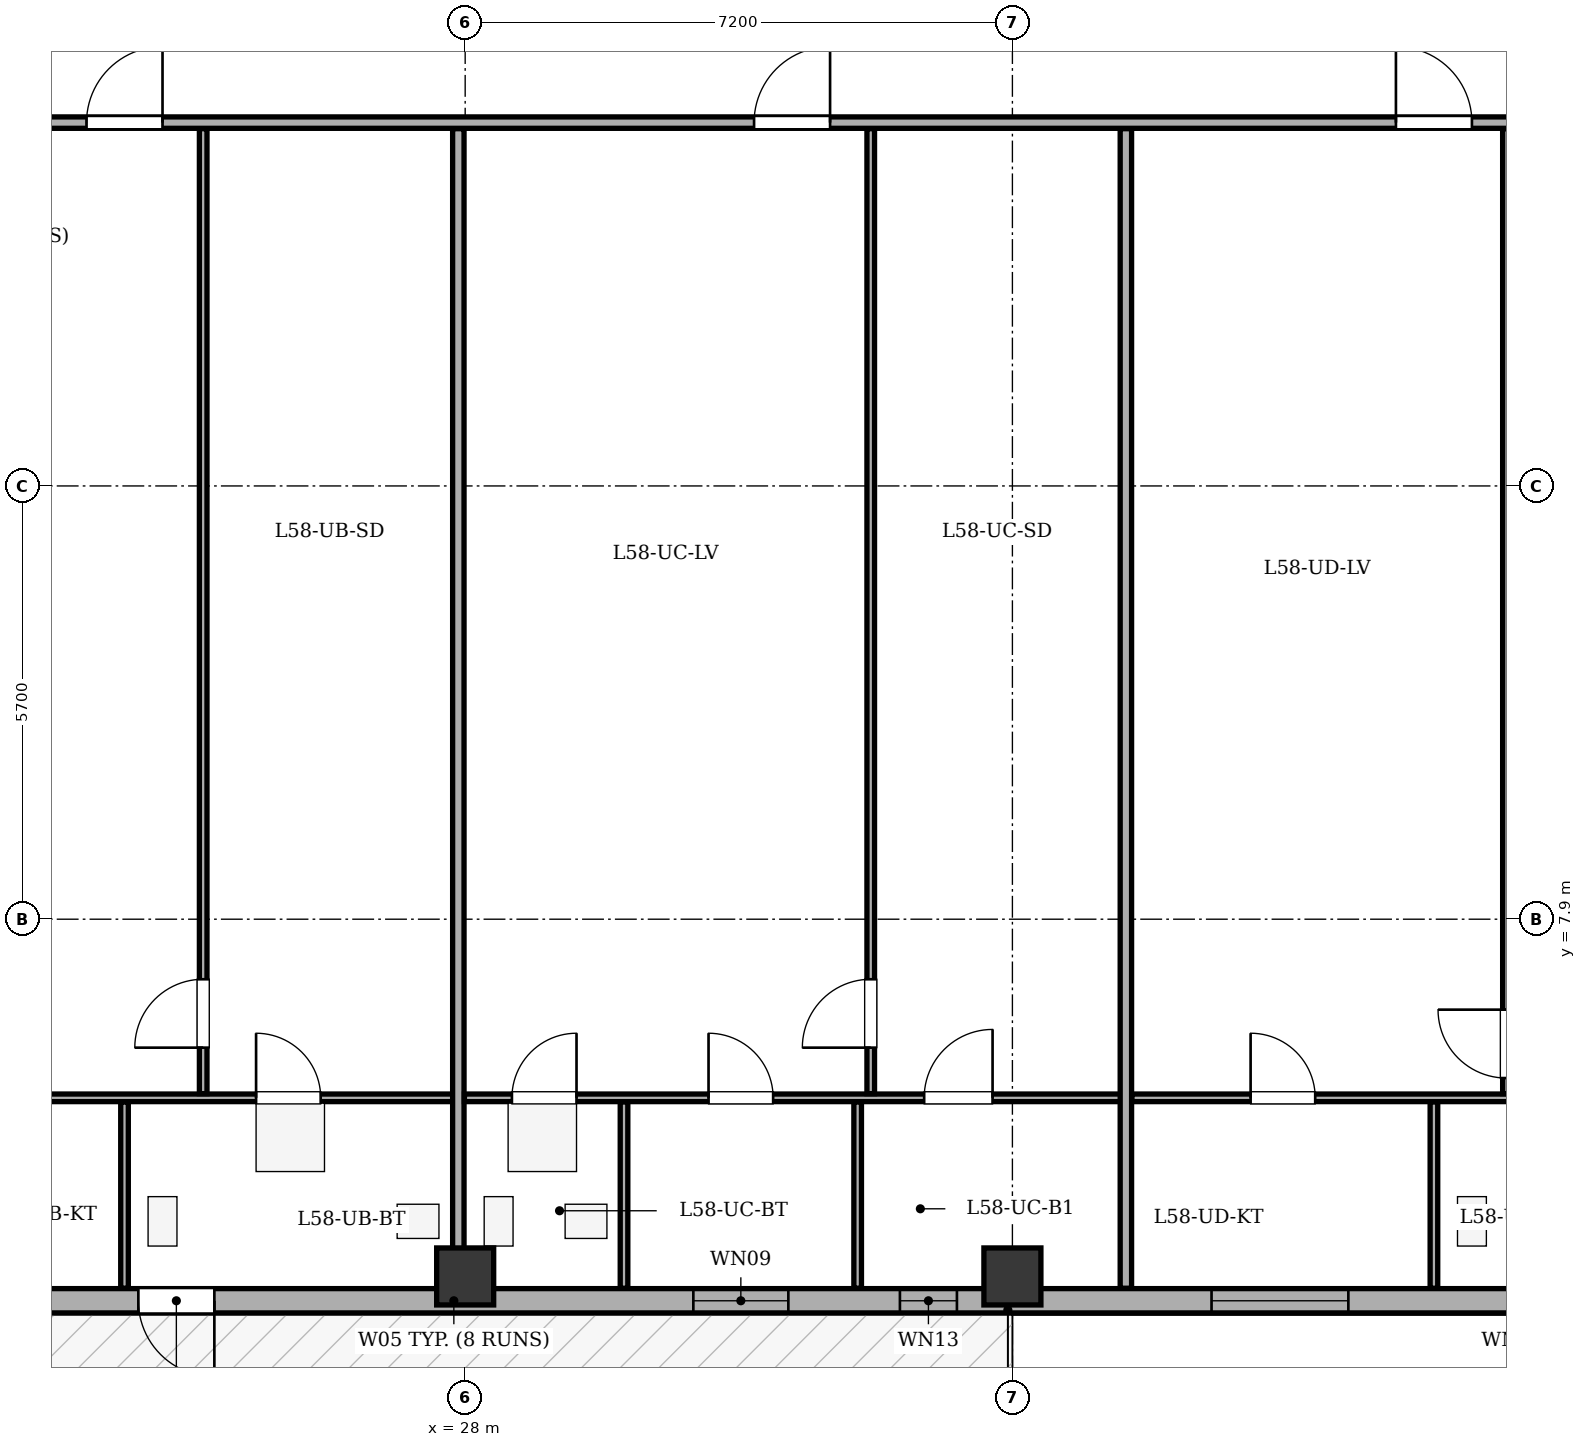
"""IFC4 building model, lengths in metres.
Left out: names, types, materials, properties, quantities, classifications, styles, units other than length and angle.
Written with IfcOpenShell. Run it as: python <this file> out.ifc"""

import sys

from ifc_helpers import new_model, si_unit, direction, frame, frame_2d, origin, origin_2d, place, context, subcontext, project, spatial, rectangle, extrude, element, fill, save


model = new_model("IFC4")
c1 = context("Model", 3, precision=1e-05, world=origin(), true_north=direction((0.0, 1.0)))
c2 = subcontext(c1, "Body", "Model", "MODEL_VIEW")
j1 = project(units=[si_unit("LENGTHUNIT", "METRE"), si_unit("PLANEANGLEUNIT", "RADIAN")], contexts=[c1])
p1 = place(None, origin())
s1 = spatial("IfcSite", under=j1, at=p1, CompositionType="ELEMENT")
p2 = place(p1, origin())
s2 = spatial("IfcBuilding", under=s1, at=p2, CompositionType="ELEMENT")
p3 = place(p2, frame((0.0, 0.0, 224.5)))
s3 = spatial("IfcBuildingStorey", under=s2, at=p3, CompositionType="ELEMENT", Elevation=224.5)
for number, where, z_axis, x_axis in (
    (1, (28.0, 3.2, 0.0), (0.0, 0.0, 1.0), (1.0, 0.0, 0.0)),
    (2, (35.2, 3.2, 0.0), (0.0, 0.0, 1.0), (1.0, 0.0, 0.0)),
):
    element("IfcColumn", number, at=place(p3, frame(where, z_axis=z_axis, x_axis=x_axis)), inside=s3, PredefinedType="COLUMN", context=c2, shape_type="SweptSolid", body=[
        extrude(rectangle(XDim=0.75, YDim=0.75, at=origin_2d()), origin(), (0.0, 0.0, 1.0), 3.4),
    ])
p4 = place(p3, frame((44.8, 2.88, 0.0), z_axis=(0.0, 0.0, 1.0), x_axis=(-1.0, 0.0, 0.0)))
e3 = element("IfcWall", 3, at=p4, inside=s3, PredefinedType="STANDARD", context=c2, shape_type="SweptSolid", body=[
    extrude(rectangle(XDim=36.0, YDim=0.32, at=frame_2d((18.0, 0.0))), origin(), (0.0, 0.0, 1.0), 2.335),
])
p5 = place(p4, frame((20.1, 0.0, 0.0)))
e4 = element("IfcOpeningElement", 4, at=p5, cuts=e3, PredefinedType="OPENING", context=c2, shape_type="SweptSolid", body=[
    extrude(rectangle(XDim=1.0, YDim=2.02, at=frame_2d((0.5, 1.01))), frame((0.0, 0.17, 0.0), z_axis=(0.0, -1.0, 0.0), x_axis=(1.0, 0.0, 0.0)), (0.0, 0.0, 1.0), 0.34),
])
p6 = place(p4, frame((1.227, 0.0, 0.75)))
e5 = element("IfcOpeningElement", 5, at=p6, cuts=e3, PredefinedType="OPENING", context=c2, shape_type="SweptSolid", body=[
    extrude(rectangle(XDim=1.8, YDim=1.465, at=frame_2d((0.9, 0.732))), frame((0.0, 0.17, 0.0), z_axis=(0.0, -1.0, 0.0), x_axis=(1.0, 0.0, 0.0)), (0.0, 0.0, 1.0), 0.34),
])
p7 = place(p4, frame((5.18, 0.0, 0.75)))
e6 = element("IfcOpeningElement", 6, at=p7, cuts=e3, PredefinedType="OPENING", context=c2, shape_type="SweptSolid", body=[
    extrude(rectangle(XDim=1.8, YDim=1.465, at=frame_2d((0.9, 0.732))), frame((0.0, 0.17, 0.0), z_axis=(0.0, -1.0, 0.0), x_axis=(1.0, 0.0, 0.0)), (0.0, 0.0, 1.0), 0.34),
])
p8 = place(p4, frame((12.548, 0.0, 0.75)))
e7 = element("IfcOpeningElement", 7, at=p8, cuts=e3, PredefinedType="OPENING", context=c2, shape_type="SweptSolid", body=[
    extrude(rectangle(XDim=1.25, YDim=1.465, at=frame_2d((0.625, 0.732))), frame((0.0, 0.17, 0.0), z_axis=(0.0, -1.0, 0.0), x_axis=(1.0, 0.0, 0.0)), (0.0, 0.0, 1.0), 0.34),
])
p9 = place(p4, frame((26.587, 0.0, 0.75)))
e8 = element("IfcOpeningElement", 8, at=p9, cuts=e3, PredefinedType="OPENING", context=c2, shape_type="SweptSolid", body=[
    extrude(rectangle(XDim=1.8, YDim=1.465, at=frame_2d((0.9, 0.732))), frame((0.0, 0.17, 0.0), z_axis=(0.0, -1.0, 0.0), x_axis=(1.0, 0.0, 0.0)), (0.0, 0.0, 1.0), 0.34),
])
p10 = place(p4, frame((30.94, 0.0, 0.75)))
e9 = element("IfcOpeningElement", 9, at=p10, cuts=e3, PredefinedType="OPENING", context=c2, shape_type="SweptSolid", body=[
    extrude(rectangle(XDim=1.8, YDim=1.465, at=frame_2d((0.9, 0.732))), frame((0.0, 0.17, 0.0), z_axis=(0.0, -1.0, 0.0), x_axis=(1.0, 0.0, 0.0)), (0.0, 0.0, 1.0), 0.34),
])
p11 = place(p4, frame((10.33, 0.0, 0.75)))
e10 = element("IfcOpeningElement", 10, at=p11, cuts=e3, PredefinedType="OPENING", context=c2, shape_type="SweptSolid", body=[
    extrude(rectangle(XDim=0.75, YDim=1.45, at=frame_2d((0.375, 0.725))), frame((0.0, 0.17, 0.0), z_axis=(0.0, -1.0, 0.0), x_axis=(1.0, 0.0, 0.0)), (0.0, 0.0, 1.0), 0.34),
])
p12 = place(p3, frame((10.9, 18.38, 0.0), z_axis=(0.0, 0.0, 1.0), x_axis=(1.0, 0.0, 0.0)))
e11 = element("IfcWall", 11, at=p12, inside=s3, PredefinedType="PARTITIONING", context=c2, shape_type="SweptSolid", body=[
    extrude(rectangle(XDim=34.02, YDim=0.15, at=frame_2d((17.01, 0.0))), origin(), (0.0, 0.0, 1.0), 2.95),
])
p13 = place(p12, frame((2.774, 0.0, 0.0)))
e12 = element("IfcOpeningElement", 12, at=p13, cuts=e11, PredefinedType="OPENING", context=c2, shape_type="SweptSolid", body=[
    extrude(rectangle(XDim=1.0, YDim=2.1, at=frame_2d((0.5, 1.05))), frame((0.0, 0.085, 0.0), z_axis=(0.0, -1.0, 0.0), x_axis=(1.0, 0.0, 0.0)), (0.0, 0.0, 1.0), 0.17),
])
p14 = place(p12, frame((12.118, 0.0, 0.0)))
e13 = element("IfcOpeningElement", 13, at=p14, cuts=e11, PredefinedType="OPENING", context=c2, shape_type="SweptSolid", body=[
    extrude(rectangle(XDim=1.0, YDim=2.1, at=frame_2d((0.5, 1.05))), frame((0.0, 0.085, 0.0), z_axis=(0.0, -1.0, 0.0), x_axis=(1.0, 0.0, 0.0)), (0.0, 0.0, 1.0), 0.17),
])
p15 = place(p12, frame((20.901, 0.0, 0.0)))
e14 = element("IfcOpeningElement", 14, at=p15, cuts=e11, PredefinedType="OPENING", context=c2, shape_type="SweptSolid", body=[
    extrude(rectangle(XDim=1.0, YDim=2.1, at=frame_2d((0.5, 1.05))), frame((0.0, 0.085, 0.0), z_axis=(0.0, -1.0, 0.0), x_axis=(1.0, 0.0, 0.0)), (0.0, 0.0, 1.0), 0.17),
])
p16 = place(p12, frame((29.346, 0.0, 0.0)))
e15 = element("IfcOpeningElement", 15, at=p16, cuts=e11, PredefinedType="OPENING", context=c2, shape_type="SweptSolid", body=[
    extrude(rectangle(XDim=1.0, YDim=2.1, at=frame_2d((0.5, 1.05))), frame((0.0, 0.085, 0.0), z_axis=(0.0, -1.0, 0.0), x_axis=(1.0, 0.0, 0.0)), (0.0, 0.0, 1.0), 0.17),
])
p17 = place(p3, frame((19.207, 5.55, 0.0), z_axis=(0.0, 0.0, 1.0), x_axis=(1.0, 0.0, 0.0)))
e16 = element("IfcWall", 16, at=p17, inside=s3, PredefinedType="PARTITIONING", context=c2, shape_type="SweptSolid", body=[
    extrude(rectangle(XDim=8.743, YDim=0.1, at=frame_2d((4.372, 0.0))), origin(), (0.0, 0.0, 1.0), 2.95),
])
p18 = place(p17, frame((1.83, 0.0, 0.0)))
e17 = element("IfcOpeningElement", 17, at=p18, cuts=e16, PredefinedType="OPENING", context=c2, shape_type="SweptSolid", body=[
    extrude(rectangle(XDim=0.85, YDim=2.05, at=frame_2d((0.425, 1.025))), frame((0.0, 0.06, 0.0), z_axis=(0.0, -1.0, 0.0), x_axis=(1.0, 0.0, 0.0)), (0.0, 0.0, 1.0), 0.12),
])
p19 = place(p17, frame((6.042, 0.0, 0.0)))
e18 = element("IfcOpeningElement", 18, at=p19, cuts=e16, PredefinedType="OPENING", context=c2, shape_type="SweptSolid", body=[
    extrude(rectangle(XDim=0.85, YDim=2.05, at=frame_2d((0.425, 1.025))), frame((0.0, 0.06, 0.0), z_axis=(0.0, -1.0, 0.0), x_axis=(1.0, 0.0, 0.0)), (0.0, 0.0, 1.0), 0.12),
])
p20 = place(p3, frame((24.553, 5.605, 0.0), z_axis=(0.0, 0.0, 1.0), x_axis=(0.0, 1.0, 0.0)))
e19 = element("IfcWall", 19, at=p20, inside=s3, PredefinedType="PARTITIONING", context=c2, shape_type="SweptSolid", body=[
    extrude(rectangle(XDim=12.695, YDim=0.1, at=frame_2d((6.348, 0.0))), origin(), (0.0, 0.0, 1.0), 2.95),
])
p21 = place(p20, frame((0.605, 0.0, 0.0)))
e20 = element("IfcOpeningElement", 20, at=p21, cuts=e19, PredefinedType="OPENING", context=c2, shape_type="SweptSolid", body=[
    extrude(rectangle(XDim=0.9, YDim=2.05, at=frame_2d((0.45, 1.025))), frame((0.0, 0.06, 0.0), z_axis=(0.0, -1.0, 0.0), x_axis=(1.0, 0.0, 0.0)), (0.0, 0.0, 1.0), 0.12),
])
p22 = place(p3, frame((23.518, 3.045, 0.0), z_axis=(0.0, 0.0, 1.0), x_axis=(0.0, 1.0, 0.0)))
e21 = element("IfcWall", 21, at=p22, inside=s3, PredefinedType="PARTITIONING", context=c2, shape_type="SweptSolid", body=[
    extrude(rectangle(XDim=2.45, YDim=0.1, at=frame_2d((1.225, 0.0))), origin(), (0.0, 0.0, 1.0), 2.95),
])
p23 = place(p3, frame((27.91, 3.045, 0.0), z_axis=(0.0, 0.0, 1.0), x_axis=(0.0, 1.0, 0.0)))
e22 = element("IfcWall", 22, at=p23, inside=s3, PredefinedType="PARTITIONING", context=c2, shape_type="SweptSolid", body=[
    extrude(rectangle(XDim=15.255, YDim=0.15, at=frame_2d((7.627, 0.0))), origin(), (0.0, 0.0, 1.0), 2.135),
])
p24 = place(p3, frame((27.99, 5.55, 0.0), z_axis=(0.0, 0.0, 1.0), x_axis=(1.0, 0.0, 0.0)))
e23 = element("IfcWall", 23, at=p24, inside=s3, PredefinedType="PARTITIONING", context=c2, shape_type="SweptSolid", body=[
    extrude(rectangle(XDim=8.743, YDim=0.1, at=frame_2d((4.372, 0.0))), origin(), (0.0, 0.0, 1.0), 2.95),
])
p25 = place(p24, frame((0.625, 0.0, 0.0)))
e24 = element("IfcOpeningElement", 24, at=p25, cuts=e23, PredefinedType="OPENING", context=c2, shape_type="SweptSolid", body=[
    extrude(rectangle(XDim=0.85, YDim=2.05, at=frame_2d((0.425, 1.025))), frame((0.0, 0.06, 0.0), z_axis=(0.0, -1.0, 0.0), x_axis=(1.0, 0.0, 0.0)), (0.0, 0.0, 1.0), 0.12),
])
p26 = place(p24, frame((3.212, 0.0, 0.0)))
e25 = element("IfcOpeningElement", 25, at=p26, cuts=e23, PredefinedType="OPENING", context=c2, shape_type="SweptSolid", body=[
    extrude(rectangle(XDim=0.85, YDim=2.05, at=frame_2d((0.425, 1.025))), frame((0.0, 0.06, 0.0), z_axis=(0.0, -1.0, 0.0), x_axis=(1.0, 0.0, 0.0)), (0.0, 0.0, 1.0), 0.12),
])
p27 = place(p24, frame((6.049, 0.0, 0.0)))
e26 = element("IfcOpeningElement", 26, at=p27, cuts=e23, PredefinedType="OPENING", context=c2, shape_type="SweptSolid", body=[
    extrude(rectangle(XDim=0.9, YDim=2.05, at=frame_2d((0.45, 1.025))), frame((0.0, 0.06, 0.0), z_axis=(0.0, -1.0, 0.0), x_axis=(1.0, 0.0, 0.0)), (0.0, 0.0, 1.0), 0.12),
])
p28 = place(p3, frame((33.336, 5.605, 0.0), z_axis=(0.0, 0.0, 1.0), x_axis=(0.0, 1.0, 0.0)))
e27 = element("IfcWall", 27, at=p28, inside=s3, PredefinedType="PARTITIONING", context=c2, shape_type="SweptSolid", body=[
    extrude(rectangle(XDim=12.695, YDim=0.1, at=frame_2d((6.348, 0.0))), origin(), (0.0, 0.0, 1.0), 2.95),
])
p29 = place(p28, frame((0.605, 0.0, 0.0)))
e28 = element("IfcOpeningElement", 28, at=p29, cuts=e27, PredefinedType="OPENING", context=c2, shape_type="SweptSolid", body=[
    extrude(rectangle(XDim=0.9, YDim=2.05, at=frame_2d((0.45, 1.025))), frame((0.0, 0.06, 0.0), z_axis=(0.0, -1.0, 0.0), x_axis=(1.0, 0.0, 0.0)), (0.0, 0.0, 1.0), 0.12),
])
for number, where, z_axis, x_axis in (
    (29, (30.09, 3.045, 0.0), (0.0, 0.0, 1.0), (0.0, 1.0, 0.0)),
    (30, (33.164, 3.045, 0.0), (0.0, 0.0, 1.0), (0.0, 1.0, 0.0)),
):
    element("IfcWall", number, at=place(p3, frame(where, z_axis=z_axis, x_axis=x_axis)), inside=s3, PredefinedType="PARTITIONING", context=c2, shape_type="SweptSolid", body=[
        extrude(rectangle(XDim=2.45, YDim=0.1, at=frame_2d((1.225, 0.0))), origin(), (0.0, 0.0, 1.0), 2.95),
    ])
p30 = place(p3, frame((36.693, 3.045, 0.0), z_axis=(0.0, 0.0, 1.0), x_axis=(0.0, 1.0, 0.0)))
e31 = element("IfcWall", 31, at=p30, inside=s3, PredefinedType="PARTITIONING", context=c2, shape_type="SweptSolid", body=[
    extrude(rectangle(XDim=15.255, YDim=0.15, at=frame_2d((7.627, 0.0))), origin(), (0.0, 0.0, 1.0), 2.385),
])
p31 = place(p3, frame((36.773, 5.55, 0.0), z_axis=(0.0, 0.0, 1.0), x_axis=(1.0, 0.0, 0.0)))
e32 = element("IfcWall", 32, at=p31, inside=s3, PredefinedType="PARTITIONING", context=c2, shape_type="SweptSolid", body=[
    extrude(rectangle(XDim=8.067, YDim=0.1, at=frame_2d((4.034, 0.0))), origin(), (0.0, 0.0, 1.0), 2.95),
])
p32 = place(p31, frame((1.561, 0.0, 0.0)))
e33 = element("IfcOpeningElement", 33, at=p32, cuts=e32, PredefinedType="OPENING", context=c2, shape_type="SweptSolid", body=[
    extrude(rectangle(XDim=0.85, YDim=2.05, at=frame_2d((0.425, 1.025))), frame((0.0, 0.06, 0.0), z_axis=(0.0, -1.0, 0.0), x_axis=(1.0, 0.0, 0.0)), (0.0, 0.0, 1.0), 0.12),
])
p33 = place(p31, frame((5.535, 0.0, 0.0)))
e34 = element("IfcOpeningElement", 34, at=p33, cuts=e32, PredefinedType="OPENING", context=c2, shape_type="SweptSolid", body=[
    extrude(rectangle(XDim=0.85, YDim=2.05, at=frame_2d((0.425, 1.025))), frame((0.0, 0.06, 0.0), z_axis=(0.0, -1.0, 0.0), x_axis=(1.0, 0.0, 0.0)), (0.0, 0.0, 1.0), 0.12),
])
p34 = place(p3, frame((41.7, 5.605, 0.0), z_axis=(0.0, 0.0, 1.0), x_axis=(0.0, 1.0, 0.0)))
e35 = element("IfcWall", 35, at=p34, inside=s3, PredefinedType="PARTITIONING", context=c2, shape_type="SweptSolid", body=[
    extrude(rectangle(XDim=12.695, YDim=0.1, at=frame_2d((6.348, 0.0))), origin(), (0.0, 0.0, 1.0), 2.95),
])
p35 = place(p34, frame((0.205, 0.0, 0.0)))
e36 = element("IfcOpeningElement", 36, at=p35, cuts=e35, PredefinedType="OPENING", context=c2, shape_type="SweptSolid", body=[
    extrude(rectangle(XDim=0.9, YDim=2.05, at=frame_2d((0.45, 1.025))), frame((0.0, 0.06, 0.0), z_axis=(0.0, -1.0, 0.0), x_axis=(1.0, 0.0, 0.0)), (0.0, 0.0, 1.0), 0.12),
])
p36 = place(p3, frame((40.746, 3.045, 0.0), z_axis=(0.0, 0.0, 1.0), x_axis=(0.0, 1.0, 0.0)))
e37 = element("IfcWall", 37, at=p36, inside=s3, PredefinedType="PARTITIONING", context=c2, shape_type="SweptSolid", body=[
    extrude(rectangle(XDim=2.45, YDim=0.1, at=frame_2d((1.225, 0.0))), origin(), (0.0, 0.0, 1.0), 2.95),
])
p37 = place(p5, origin())
e38 = element("IfcDoor", 38, at=p37, inside=s3, OperationType="SINGLE_SWING_LEFT", PredefinedType="DOOR", context=c2, shape_type="SweptSolid", body=[
    extrude(rectangle(XDim=1.0, YDim=2.02, at=frame_2d((0.5, 1.01))), frame((0.0, 0.025, 0.0), z_axis=(0.0, -1.0, 0.0), x_axis=(1.0, 0.0, 0.0)), (0.0, 0.0, 1.0), 0.05),
])
fill(e4, e38)
p38 = place(p7, origin())
e39 = element("IfcWindow", 39, at=p38, inside=s3, PartitioningType="SINGLE_PANEL", PredefinedType="WINDOW", context=c2, shape_type="SweptSolid", body=[
    extrude(rectangle(XDim=1.8, YDim=1.465, at=frame_2d((0.9, 0.732))), frame((0.0, -0.01, 0.0), z_axis=(0.0, -1.0, 0.0), x_axis=(1.0, 0.0, 0.0)), (0.0, 0.0, 1.0), 0.06),
])
fill(e6, e39)
p39 = place(p8, origin())
e40 = element("IfcWindow", 40, at=p39, inside=s3, PartitioningType="SINGLE_PANEL", PredefinedType="WINDOW", context=c2, shape_type="SweptSolid", body=[
    extrude(rectangle(XDim=1.25, YDim=1.465, at=frame_2d((0.625, 0.732))), frame((0.0, -0.01, 0.0), z_axis=(0.0, -1.0, 0.0), x_axis=(1.0, 0.0, 0.0)), (0.0, 0.0, 1.0), 0.06),
])
fill(e7, e40)
p40 = place(p11, origin())
e41 = element("IfcWindow", 41, at=p40, inside=s3, PartitioningType="SINGLE_PANEL", PredefinedType="WINDOW", context=c2, shape_type="SweptSolid", body=[
    extrude(rectangle(XDim=0.75, YDim=1.45, at=frame_2d((0.375, 0.725))), frame((0.0, -0.01, 0.0), z_axis=(0.0, -1.0, 0.0), x_axis=(1.0, 0.0, 0.0)), (0.0, 0.0, 1.0), 0.06),
])
fill(e10, e41)
p41 = place(p14, origin())
e42 = element("IfcDoor", 42, at=p41, inside=s3, OperationType="SINGLE_SWING_RIGHT", PredefinedType="DOOR", context=c2, shape_type="SweptSolid", body=[
    extrude(rectangle(XDim=1.0, YDim=2.1, at=frame_2d((0.5, 1.05))), frame((0.0, 0.025, 0.0), z_axis=(0.0, -1.0, 0.0), x_axis=(1.0, 0.0, 0.0)), (0.0, 0.0, 1.0), 0.05),
])
fill(e13, e42)
p42 = place(p15, origin())
e43 = element("IfcDoor", 43, at=p42, inside=s3, OperationType="SINGLE_SWING_RIGHT", PredefinedType="DOOR", context=c2, shape_type="SweptSolid", body=[
    extrude(rectangle(XDim=1.0, YDim=2.1, at=frame_2d((0.5, 1.05))), frame((0.0, 0.025, 0.0), z_axis=(0.0, -1.0, 0.0), x_axis=(1.0, 0.0, 0.0)), (0.0, 0.0, 1.0), 0.05),
])
fill(e14, e43)
p43 = place(p16, origin())
e44 = element("IfcDoor", 44, at=p43, inside=s3, OperationType="SINGLE_SWING_LEFT", PredefinedType="DOOR", context=c2, shape_type="SweptSolid", body=[
    extrude(rectangle(XDim=1.0, YDim=2.1, at=frame_2d((0.5, 1.05))), frame((0.0, 0.025, 0.0), z_axis=(0.0, -1.0, 0.0), x_axis=(1.0, 0.0, 0.0)), (0.0, 0.0, 1.0), 0.05),
])
fill(e15, e44)
p44 = place(p21, origin())
e45 = element("IfcDoor", 45, at=p44, inside=s3, OperationType="SINGLE_SWING_LEFT", PredefinedType="DOOR", context=c2, shape_type="SweptSolid", body=[
    extrude(rectangle(XDim=0.9, YDim=2.05, at=frame_2d((0.45, 1.025))), frame((0.0, 0.025, 0.0), z_axis=(0.0, -1.0, 0.0), x_axis=(1.0, 0.0, 0.0)), (0.0, 0.0, 1.0), 0.05),
])
fill(e20, e45)
p45 = place(p19, origin())
e46 = element("IfcDoor", 46, at=p45, inside=s3, OperationType="SINGLE_SWING_LEFT", PredefinedType="DOOR", context=c2, shape_type="SweptSolid", body=[
    extrude(rectangle(XDim=0.85, YDim=2.05, at=frame_2d((0.425, 1.025))), frame((0.0, 0.025, 0.0), z_axis=(0.0, -1.0, 0.0), x_axis=(1.0, 0.0, 0.0)), (0.0, 0.0, 1.0), 0.05),
])
fill(e18, e46)
p46 = place(p29, origin())
e47 = element("IfcDoor", 47, at=p46, inside=s3, OperationType="SINGLE_SWING_LEFT", PredefinedType="DOOR", context=c2, shape_type="SweptSolid", body=[
    extrude(rectangle(XDim=0.9, YDim=2.05, at=frame_2d((0.45, 1.025))), frame((0.0, 0.025, 0.0), z_axis=(0.0, -1.0, 0.0), x_axis=(1.0, 0.0, 0.0)), (0.0, 0.0, 1.0), 0.05),
])
fill(e28, e47)
p47 = place(p25, origin())
e48 = element("IfcDoor", 48, at=p47, inside=s3, OperationType="SINGLE_SWING_RIGHT", PredefinedType="DOOR", context=c2, shape_type="SweptSolid", body=[
    extrude(rectangle(XDim=0.85, YDim=2.05, at=frame_2d((0.425, 1.025))), frame((0.0, 0.025, 0.0), z_axis=(0.0, -1.0, 0.0), x_axis=(1.0, 0.0, 0.0)), (0.0, 0.0, 1.0), 0.05),
])
fill(e24, e48)
p48 = place(p26, origin())
e49 = element("IfcDoor", 49, at=p48, inside=s3, OperationType="SINGLE_SWING_LEFT", PredefinedType="DOOR", context=c2, shape_type="SweptSolid", body=[
    extrude(rectangle(XDim=0.85, YDim=2.05, at=frame_2d((0.425, 1.025))), frame((0.0, 0.025, 0.0), z_axis=(0.0, -1.0, 0.0), x_axis=(1.0, 0.0, 0.0)), (0.0, 0.0, 1.0), 0.05),
])
fill(e25, e49)
p49 = place(p27, origin())
e50 = element("IfcDoor", 50, at=p49, inside=s3, OperationType="SINGLE_SWING_RIGHT", PredefinedType="DOOR", context=c2, shape_type="SweptSolid", body=[
    extrude(rectangle(XDim=0.9, YDim=2.05, at=frame_2d((0.45, 1.025))), frame((0.0, 0.025, 0.0), z_axis=(0.0, -1.0, 0.0), x_axis=(1.0, 0.0, 0.0)), (0.0, 0.0, 1.0), 0.05),
])
fill(e26, e50)
p50 = place(p35, origin())
e51 = element("IfcDoor", 51, at=p50, inside=s3, OperationType="SINGLE_SWING_RIGHT", PredefinedType="DOOR", context=c2, shape_type="SweptSolid", body=[
    extrude(rectangle(XDim=0.9, YDim=2.05, at=frame_2d((0.45, 1.025))), frame((0.0, 0.025, 0.0), z_axis=(0.0, -1.0, 0.0), x_axis=(1.0, 0.0, 0.0)), (0.0, 0.0, 1.0), 0.05),
])
fill(e36, e51)
p51 = place(p32, origin())
e52 = element("IfcDoor", 52, at=p51, inside=s3, OperationType="SINGLE_SWING_LEFT", PredefinedType="DOOR", context=c2, shape_type="SweptSolid", body=[
    extrude(rectangle(XDim=0.85, YDim=2.05, at=frame_2d((0.425, 1.025))), frame((0.0, 0.025, 0.0), z_axis=(0.0, -1.0, 0.0), x_axis=(1.0, 0.0, 0.0)), (0.0, 0.0, 1.0), 0.05),
])
fill(e33, e52)
save(model, sys.argv[1])
